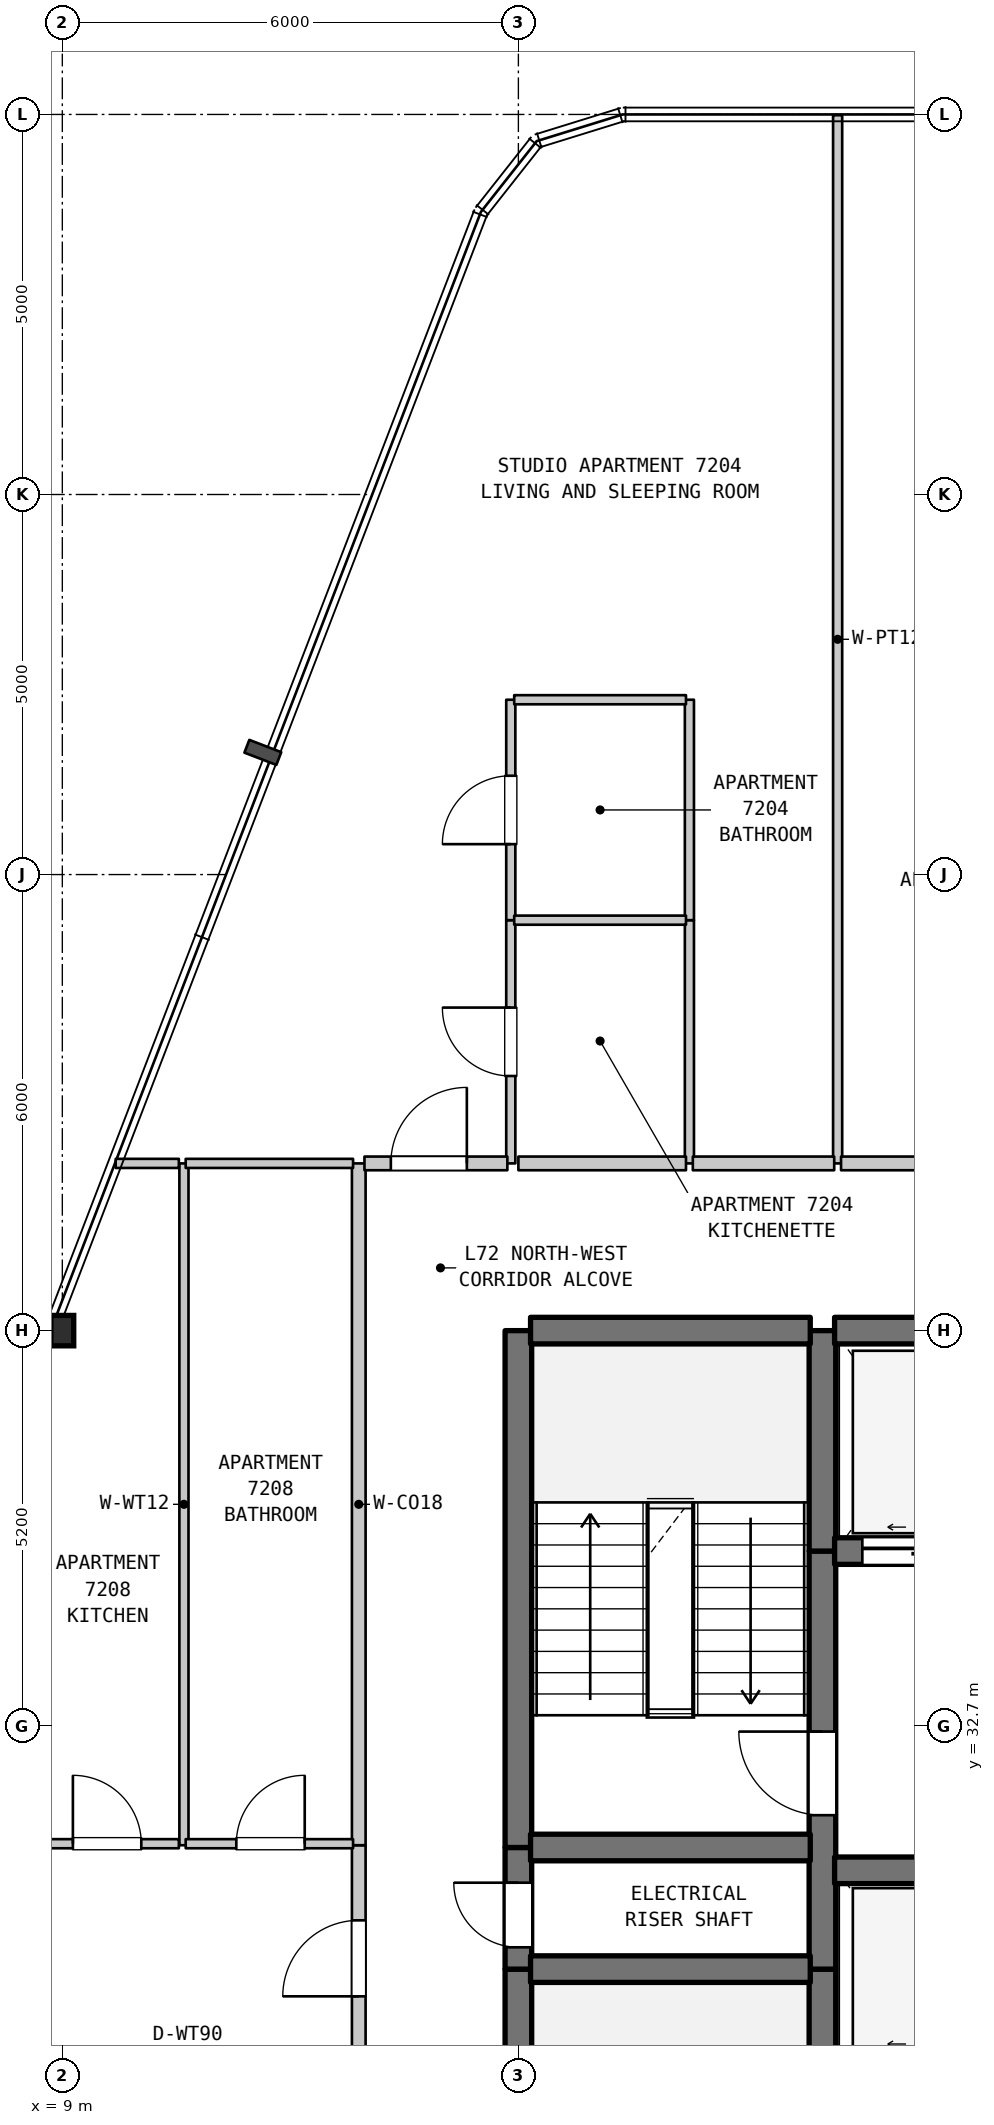
"""IFC4 building model, lengths in metres.
Left out: names, types, materials, properties, quantities, classifications, styles, units other than length and angle.
Written with IfcOpenShell. Run it as: python <this file> out.ifc"""

import sys

from ifc_helpers import new_model, si_unit, direction, frame, frame_2d, origin, origin_2d, place, context, subcontext, project, spatial, rectangle, i_section, extrude, element, fill, save


model = new_model("IFC4")
c1 = context("Model", 3, precision=1e-05, world=origin(), true_north=direction((0.0, 1.0)))
c2 = subcontext(c1, "Body", "Model", "MODEL_VIEW")
j1 = project(units=[si_unit("LENGTHUNIT", "METRE"), si_unit("PLANEANGLEUNIT", "RADIAN")], contexts=[c1])
p1 = place(None, origin())
s1 = spatial("IfcSite", under=j1, at=p1, CompositionType="ELEMENT")
p2 = place(p1, origin())
s2 = spatial("IfcBuilding", under=s1, at=p2, CompositionType="ELEMENT")
p3 = place(p2, frame((0.0, 0.0, 288.0)))
s3 = spatial("IfcBuildingStorey", under=s2, at=p3, CompositionType="ELEMENT", Elevation=288.0)
p4 = place(p3, frame((9.0, 37.9, 0.0), z_axis=(0.0, 0.0, 1.0), x_axis=(1.0, 0.0, 0.0)))
e1 = element("IfcColumn", 1, at=p4, inside=s3, PredefinedType="COLUMN", context=c2, shape_type="SweptSolid", body=[
    extrude(i_section(OverallWidth=0.3, OverallDepth=0.4, WebThickness=0.013, FlangeThickness=0.024, FilletRadius=0.027, at=origin_2d()), origin(), (0.0, 0.0, 1.0), 3.7),
])
p5 = place(p3, frame((10.6, 31.13, 0.0), z_axis=(0.0, 0.0, 1.0), x_axis=(0.0, 1.0, 0.0)))
e2 = element("IfcWall", 2, at=p5, inside=s3, PredefinedType="PARTITIONING", context=c2, shape_type="SweptSolid", body=[
    extrude(rectangle(XDim=8.97, YDim=0.12, at=frame_2d((4.485, 0.0))), origin(), (0.0, 0.0, 1.0), 3.39),
])
p6 = place(p3, frame((12.9, 28.3, 0.0), z_axis=(0.0, 0.0, 1.0), x_axis=(0.0, 1.0, 0.0)))
e3 = element("IfcWall", 3, at=p6, inside=s3, PredefinedType="STANDARD", context=c2, shape_type="SweptSolid", body=[
    extrude(rectangle(XDim=2.83, YDim=0.18, at=frame_2d((1.415, 0.0))), origin(), (0.0, 0.0, 1.0), 3.39),
])
p7 = place(p6, frame((0.842, 0.0, 0.0)))
e4 = element("IfcOpeningElement", 4, at=p7, cuts=e3, PredefinedType="OPENING", context=c2, shape_type="SweptSolid", body=[
    extrude(rectangle(XDim=1.0, YDim=2.15, at=frame_2d((0.5, 1.075))), frame((0.0, 0.1, 0.0), z_axis=(0.0, -1.0, 0.0), x_axis=(1.0, 0.0, 0.0)), (0.0, 0.0, 1.0), 0.2),
])
p8 = place(p3, frame((12.9, 31.13, 0.0), z_axis=(0.0, 0.0, 1.0), x_axis=(0.0, 1.0, 0.0)))
e5 = element("IfcWall", 5, at=p8, inside=s3, PredefinedType="STANDARD", context=c2, shape_type="SweptSolid", body=[
    extrude(rectangle(XDim=8.97, YDim=0.18, at=frame_2d((4.485, 0.0))), origin(), (0.0, 0.0, 1.0), 3.39),
])
p9 = place(p3, frame((14.9, 40.1, 0.0), z_axis=(0.0, 0.0, 1.0), x_axis=(0.0, 1.0, 0.0)))
e6 = element("IfcWall", 6, at=p9, inside=s3, PredefinedType="PARTITIONING", context=c2, shape_type="SweptSolid", body=[
    extrude(rectangle(XDim=3.2, YDim=0.12, at=frame_2d((1.6, 0.0))), origin(), (0.0, 0.0, 1.0), 3.39),
])
p10 = place(p9, frame((1.15, 0.0, 0.0)))
e7 = element("IfcOpeningElement", 7, at=p10, cuts=e6, PredefinedType="OPENING", context=c2, shape_type="SweptSolid", body=[
    extrude(rectangle(XDim=0.9, YDim=2.15, at=frame_2d((0.45, 1.075))), frame((0.0, 0.07, 0.0), z_axis=(0.0, -1.0, 0.0), x_axis=(1.0, 0.0, 0.0)), (0.0, 0.0, 1.0), 0.14),
])
p11 = place(p3, frame((14.9, 43.3, 0.0), z_axis=(0.0, 0.0, 1.0), x_axis=(0.0, 1.0, 0.0)))
e8 = element("IfcWall", 8, at=p11, inside=s3, PredefinedType="PARTITIONING", context=c2, shape_type="SweptSolid", body=[
    extrude(rectangle(XDim=2.9, YDim=0.12, at=frame_2d((1.45, 0.0))), origin(), (0.0, 0.0, 1.0), 3.39),
])
p12 = place(p11, frame((1.0, 0.0, 0.0)))
e9 = element("IfcOpeningElement", 9, at=p12, cuts=e8, PredefinedType="OPENING", context=c2, shape_type="SweptSolid", body=[
    extrude(rectangle(XDim=0.9, YDim=2.1, at=frame_2d((0.45, 1.05))), frame((0.0, 0.07, 0.0), z_axis=(0.0, -1.0, 0.0), x_axis=(1.0, 0.0, 0.0)), (0.0, 0.0, 1.0), 0.14),
])
p13 = place(p3, frame((15.0, 22.7, 0.0), z_axis=(0.0, 0.0, 1.0), x_axis=(0.0, 1.0, 0.0)))
e10 = element("IfcWall", 10, at=p13, inside=s3, PredefinedType="SHEAR", context=c2, shape_type="SweptSolid", body=[
    extrude(rectangle(XDim=6.8, YDim=0.35, at=frame_2d((3.4, 0.0))), origin(), (0.0, 0.0, 1.0), 3.39),
])
p14 = place(p3, frame((15.0, 29.5, 0.0), z_axis=(0.0, 0.0, 1.0), x_axis=(0.0, 1.0, 0.0)))
e11 = element("IfcWall", 11, at=p14, inside=s3, PredefinedType="SHEAR", context=c2, shape_type="SweptSolid", body=[
    extrude(rectangle(XDim=1.6, YDim=0.35, at=frame_2d((0.8, 0.0))), origin(), (0.0, 0.0, 1.0), 3.39),
])
p15 = place(p14, frame((0.287, 0.0, 0.0)))
e12 = element("IfcOpeningElement", 12, at=p15, cuts=e11, PredefinedType="OPENING", context=c2, shape_type="SweptSolid", body=[
    extrude(rectangle(XDim=0.85, YDim=2.1, at=frame_2d((0.425, 1.05))), frame((0.0, 0.185, 0.0), z_axis=(0.0, -1.0, 0.0), x_axis=(1.0, 0.0, 0.0)), (0.0, 0.0, 1.0), 0.37),
])
p16 = place(p3, frame((15.0, 31.1, 0.0), z_axis=(0.0, 0.0, 1.0), x_axis=(0.0, 1.0, 0.0)))
e13 = element("IfcWall", 13, at=p16, inside=s3, PredefinedType="SHEAR", context=c2, shape_type="SweptSolid", body=[
    extrude(rectangle(XDim=6.8, YDim=0.35, at=frame_2d((3.4, 0.0))), origin(), (0.0, 0.0, 1.0), 3.39),
])
p17 = place(p3, frame((17.25, 40.1, 0.0), z_axis=(0.0, 0.0, 1.0), x_axis=(0.0, 1.0, 0.0)))
e14 = element("IfcWall", 14, at=p17, inside=s3, PredefinedType="PARTITIONING", context=c2, shape_type="SweptSolid", body=[
    extrude(rectangle(XDim=3.2, YDim=0.12, at=frame_2d((1.6, 0.0))), origin(), (0.0, 0.0, 1.0), 3.39),
])
p18 = place(p3, frame((17.25, 43.3, 0.0), z_axis=(0.0, 0.0, 1.0), x_axis=(0.0, 1.0, 0.0)))
e15 = element("IfcWall", 15, at=p18, inside=s3, PredefinedType="PARTITIONING", context=c2, shape_type="SweptSolid", body=[
    extrude(rectangle(XDim=2.9, YDim=0.12, at=frame_2d((1.45, 0.0))), origin(), (0.0, 0.0, 1.0), 3.39),
])
p19 = place(p3, frame((19.0, 28.2, 0.0), z_axis=(0.0, 0.0, 1.0), x_axis=(0.0, 1.0, 0.0)))
e16 = element("IfcWall", 16, at=p19, inside=s3, PredefinedType="SHEAR", context=c2, shape_type="SweptSolid", body=[
    extrude(rectangle(XDim=1.3, YDim=0.35, at=frame_2d((0.65, 0.0))), origin(), (0.0, 0.0, 1.0), 3.39),
])
p20 = place(p3, frame((19.0, 29.5, 0.0), z_axis=(0.0, 0.0, 1.0), x_axis=(0.0, 1.0, 0.0)))
e17 = element("IfcWall", 17, at=p20, inside=s3, PredefinedType="SHEAR", context=c2, shape_type="SweptSolid", body=[
    extrude(rectangle(XDim=5.5, YDim=0.35, at=frame_2d((2.75, 0.0))), origin(), (0.0, 0.0, 1.0), 3.39),
])
p21 = place(p20, frame((2.025, 0.0, 0.0)))
e18 = element("IfcOpeningElement", 18, at=p21, cuts=e17, PredefinedType="OPENING", context=c2, shape_type="SweptSolid", body=[
    extrude(rectangle(XDim=1.1, YDim=2.15, at=frame_2d((0.55, 1.075))), frame((0.0, 0.185, 0.0), z_axis=(0.0, -1.0, 0.0), x_axis=(1.0, 0.0, 0.0)), (0.0, 0.0, 1.0), 0.37),
])
p22 = place(p3, frame((19.0, 35.0, 0.0), z_axis=(0.0, 0.0, 1.0), x_axis=(0.0, 1.0, 0.0)))
e19 = element("IfcWall", 19, at=p22, inside=s3, PredefinedType="SHEAR", context=c2, shape_type="SweptSolid", body=[
    extrude(rectangle(XDim=2.9, YDim=0.35, at=frame_2d((1.45, 0.0))), origin(), (0.0, 0.0, 1.0), 3.39),
])
p23 = place(p3, frame((19.2, 40.1, 0.0), z_axis=(0.0, 0.0, 1.0), x_axis=(0.0, 1.0, 0.0)))
e20 = element("IfcWall", 20, at=p23, inside=s3, PredefinedType="PARTITIONING", context=c2, shape_type="SweptSolid", body=[
    extrude(rectangle(XDim=13.79, YDim=0.12, at=frame_2d((6.895, 0.0))), origin(), (0.0, 0.0, 1.0), 3.39),
])
p24 = place(p3, frame((15.16, 29.5, 0.0), z_axis=(0.0, 0.0, 1.0), x_axis=(1.0, 0.0, 0.0)))
e21 = element("IfcWall", 21, at=p24, inside=s3, PredefinedType="SHEAR", context=c2, shape_type="SweptSolid", body=[
    extrude(rectangle(XDim=3.68, YDim=0.35, at=frame_2d((1.84, 0.0))), origin(), (0.0, 0.0, 1.0), 3.39),
])
p25 = place(p3, frame((19.16, 30.8, 0.0), z_axis=(0.0, 0.0, 1.0), x_axis=(1.0, 0.0, 0.0)))
e22 = element("IfcWall", 22, at=p25, inside=s3, PredefinedType="SHEAR", context=c2, shape_type="SweptSolid", body=[
    extrude(rectangle(XDim=4.48, YDim=0.35, at=frame_2d((2.24, 0.0))), origin(), (0.0, 0.0, 1.0), 3.39),
])
p26 = place(p3, frame((15.16, 31.1, 0.0), z_axis=(0.0, 0.0, 1.0), x_axis=(1.0, 0.0, 0.0)))
e23 = element("IfcWall", 23, at=p26, inside=s3, PredefinedType="SHEAR", context=c2, shape_type="SweptSolid", body=[
    extrude(rectangle(XDim=3.68, YDim=0.35, at=frame_2d((1.84, 0.0))), origin(), (0.0, 0.0, 1.0), 3.39),
])
p27 = place(p3, frame((8.645, 31.15, 0.0), z_axis=(0.0, 0.0, 1.0), x_axis=(1.0, 0.0, 0.0)))
e24 = element("IfcWall", 24, at=p27, inside=s3, PredefinedType="PARTITIONING", context=c2, shape_type="SweptSolid", body=[
    extrude(rectangle(XDim=1.888, YDim=0.12, at=frame_2d((0.944, 0.0))), origin(), (0.0, 0.0, 1.0), 3.39),
])
p28 = place(p27, frame((0.494, 0.0, 0.0)))
e25 = element("IfcOpeningElement", 25, at=p28, cuts=e24, PredefinedType="OPENING", context=c2, shape_type="SweptSolid", body=[
    extrude(rectangle(XDim=0.9, YDim=2.15, at=frame_2d((0.45, 1.075))), frame((0.0, 0.07, 0.0), z_axis=(0.0, -1.0, 0.0), x_axis=(1.0, 0.0, 0.0)), (0.0, 0.0, 1.0), 0.14),
])
p29 = place(p3, frame((10.623, 31.15, 0.0), z_axis=(0.0, 0.0, 1.0), x_axis=(1.0, 0.0, 0.0)))
e26 = element("IfcWall", 26, at=p29, inside=s3, PredefinedType="PARTITIONING", context=c2, shape_type="SweptSolid", body=[
    extrude(rectangle(XDim=2.202, YDim=0.12, at=frame_2d((1.101, 0.0))), origin(), (0.0, 0.0, 1.0), 3.39),
])
p30 = place(p29, frame((0.666, 0.0, 0.0)))
e27 = element("IfcOpeningElement", 27, at=p30, cuts=e26, PredefinedType="OPENING", context=c2, shape_type="SweptSolid", body=[
    extrude(rectangle(XDim=0.9, YDim=2.1, at=frame_2d((0.45, 1.05))), frame((0.0, 0.07, 0.0), z_axis=(0.0, -1.0, 0.0), x_axis=(1.0, 0.0, 0.0)), (0.0, 0.0, 1.0), 0.14),
])
p31 = place(p3, frame((19.16, 35.0, 0.0), z_axis=(0.0, 0.0, 1.0), x_axis=(1.0, 0.0, 0.0)))
e28 = element("IfcWall", 28, at=p31, inside=s3, PredefinedType="SHEAR", context=c2, shape_type="SweptSolid", body=[
    extrude(rectangle(XDim=4.48, YDim=0.35, at=frame_2d((2.24, 0.0))), origin(), (0.0, 0.0, 1.0), 3.39),
])
p32 = place(p31, frame((0.365, 0.0, 0.0)))
e29 = element("IfcOpeningElement", 29, at=p32, cuts=e28, PredefinedType="OPENING", context=c2, shape_type="SweptSolid", body=[
    extrude(rectangle(XDim=1.35, YDim=2.2, at=frame_2d((0.675, 1.1))), frame((0.0, 0.185, 0.0), z_axis=(0.0, -1.0, 0.0), x_axis=(1.0, 0.0, 0.0)), (0.0, 0.0, 1.0), 0.37),
])
p33 = place(p31, frame((2.765, 0.0, 0.0)))
e30 = element("IfcOpeningElement", 30, at=p33, cuts=e28, PredefinedType="OPENING", context=c2, shape_type="SweptSolid", body=[
    extrude(rectangle(XDim=1.35, YDim=2.2, at=frame_2d((0.675, 1.1))), frame((0.0, 0.185, 0.0), z_axis=(0.0, -1.0, 0.0), x_axis=(1.0, 0.0, 0.0)), (0.0, 0.0, 1.0), 0.37),
])
p34 = place(p3, frame((15.16, 37.9, 0.0), z_axis=(0.0, 0.0, 1.0), x_axis=(1.0, 0.0, 0.0)))
e31 = element("IfcWall", 31, at=p34, inside=s3, PredefinedType="SHEAR", context=c2, shape_type="SweptSolid", body=[
    extrude(rectangle(XDim=3.68, YDim=0.35, at=frame_2d((1.84, 0.0))), origin(), (0.0, 0.0, 1.0), 3.39),
])
p35 = place(p3, frame((19.16, 37.9, 0.0), z_axis=(0.0, 0.0, 1.0), x_axis=(1.0, 0.0, 0.0)))
e32 = element("IfcWall", 32, at=p35, inside=s3, PredefinedType="SHEAR", context=c2, shape_type="SweptSolid", body=[
    extrude(rectangle(XDim=4.48, YDim=0.35, at=frame_2d((2.24, 0.0))), origin(), (0.0, 0.0, 1.0), 3.39),
])
p36 = place(p3, frame((9.702, 40.1, 0.0), z_axis=(0.0, 0.0, 1.0), x_axis=(1.0, 0.0, 0.0)))
e33 = element("IfcWall", 33, at=p36, inside=s3, PredefinedType="PARTITIONING", context=c2, shape_type="SweptSolid", body=[
    extrude(rectangle(XDim=0.831, YDim=0.12, at=frame_2d((0.416, 0.0))), origin(), (0.0, 0.0, 1.0), 3.39),
])
p37 = place(p3, frame((10.623, 40.1, 0.0), z_axis=(0.0, 0.0, 1.0), x_axis=(1.0, 0.0, 0.0)))
e34 = element("IfcWall", 34, at=p37, inside=s3, PredefinedType="PARTITIONING", context=c2, shape_type="SweptSolid", body=[
    extrude(rectangle(XDim=2.202, YDim=0.12, at=frame_2d((1.101, 0.0))), origin(), (0.0, 0.0, 1.0), 3.39),
])
p38 = place(p3, frame((12.975, 40.1, 0.0), z_axis=(0.0, 0.0, 1.0), x_axis=(1.0, 0.0, 0.0)))
e35 = element("IfcWall", 35, at=p38, inside=s3, PredefinedType="STANDARD", context=c2, shape_type="SweptSolid", body=[
    extrude(rectangle(XDim=1.88, YDim=0.18, at=frame_2d((0.94, 0.0))), origin(), (0.0, 0.0, 1.0), 3.39),
])
p39 = place(p38, frame((0.347, 0.0, 0.0)))
e36 = element("IfcOpeningElement", 36, at=p39, cuts=e35, PredefinedType="OPENING", context=c2, shape_type="SweptSolid", body=[
    extrude(rectangle(XDim=1.0, YDim=2.15, at=frame_2d((0.5, 1.075))), frame((0.0, 0.1, 0.0), z_axis=(0.0, -1.0, 0.0), x_axis=(1.0, 0.0, 0.0)), (0.0, 0.0, 1.0), 0.2),
])
p40 = place(p3, frame((15.0, 40.1, 0.0), z_axis=(0.0, 0.0, 1.0), x_axis=(1.0, 0.0, 0.0)))
e37 = element("IfcWall", 37, at=p40, inside=s3, PredefinedType="STANDARD", context=c2, shape_type="SweptSolid", body=[
    extrude(rectangle(XDim=2.205, YDim=0.18, at=frame_2d((1.103, 0.0))), origin(), (0.0, 0.0, 1.0), 3.39),
])
p41 = place(p3, frame((17.295, 40.1, 0.0), z_axis=(0.0, 0.0, 1.0), x_axis=(1.0, 0.0, 0.0)))
e38 = element("IfcWall", 38, at=p41, inside=s3, PredefinedType="STANDARD", context=c2, shape_type="SweptSolid", body=[
    extrude(rectangle(XDim=1.86, YDim=0.18, at=frame_2d((0.93, 0.0))), origin(), (0.0, 0.0, 1.0), 3.39),
])
p42 = place(p3, frame((19.245, 40.1, 0.0), z_axis=(0.0, 0.0, 1.0), x_axis=(1.0, 0.0, 0.0)))
e39 = element("IfcWall", 39, at=p42, inside=s3, PredefinedType="STANDARD", context=c2, shape_type="SweptSolid", body=[
    extrude(rectangle(XDim=4.42, YDim=0.18, at=frame_2d((2.21, 0.0))), origin(), (0.0, 0.0, 1.0), 3.39),
])
p43 = place(p42, frame((1.638, 0.0, 0.0)))
e40 = element("IfcOpeningElement", 40, at=p43, cuts=e39, PredefinedType="OPENING", context=c2, shape_type="SweptSolid", body=[
    extrude(rectangle(XDim=1.0, YDim=2.15, at=frame_2d((0.5, 1.075))), frame((0.0, 0.1, 0.0), z_axis=(0.0, -1.0, 0.0), x_axis=(1.0, 0.0, 0.0)), (0.0, 0.0, 1.0), 0.2),
])
for number, where, z_axis, x_axis in (
    (41, (14.945, 43.3, 0.0), (0.0, 0.0, 1.0), (1.0, 0.0, 0.0)),
    (42, (14.945, 46.2, 0.0), (0.0, 0.0, 1.0), (1.0, 0.0, 0.0)),
):
    element("IfcWall", number, at=place(p3, frame(where, z_axis=z_axis, x_axis=x_axis)), inside=s3, PredefinedType="PARTITIONING", context=c2, shape_type="SweptSolid", body=[
        extrude(rectangle(XDim=2.26, YDim=0.12, at=frame_2d((1.13, 0.0))), origin(), (0.0, 0.0, 1.0), 3.39),
    ])
p44 = place(p7, origin())
e43 = element("IfcDoor", 43, at=p44, inside=s3, OperationType="SINGLE_SWING_LEFT", PredefinedType="DOOR", context=c2, shape_type="SweptSolid", body=[
    extrude(rectangle(XDim=1.0, YDim=2.15, at=frame_2d((0.5, 1.075))), frame((0.0, 0.025, 0.0), z_axis=(0.0, -1.0, 0.0), x_axis=(1.0, 0.0, 0.0)), (0.0, 0.0, 1.0), 0.05),
])
fill(e4, e43)
p45 = place(p10, origin())
e44 = element("IfcDoor", 44, at=p45, inside=s3, OperationType="SINGLE_SWING_RIGHT", PredefinedType="DOOR", context=c2, shape_type="SweptSolid", body=[
    extrude(rectangle(XDim=0.9, YDim=2.15, at=frame_2d((0.45, 1.075))), frame((0.0, 0.025, 0.0), z_axis=(0.0, -1.0, 0.0), x_axis=(1.0, 0.0, 0.0)), (0.0, 0.0, 1.0), 0.05),
])
fill(e7, e44)
p46 = place(p12, origin())
e45 = element("IfcDoor", 45, at=p46, inside=s3, OperationType="SINGLE_SWING_LEFT", PredefinedType="DOOR", context=c2, shape_type="SweptSolid", body=[
    extrude(rectangle(XDim=0.9, YDim=2.1, at=frame_2d((0.45, 1.05))), frame((0.0, 0.025, 0.0), z_axis=(0.0, -1.0, 0.0), x_axis=(1.0, 0.0, 0.0)), (0.0, 0.0, 1.0), 0.05),
])
fill(e9, e45)
p47 = place(p15, origin())
e46 = element("IfcDoor", 46, at=p47, inside=s3, OperationType="SINGLE_SWING_RIGHT", PredefinedType="DOOR", context=c2, shape_type="SweptSolid", body=[
    extrude(rectangle(XDim=0.85, YDim=2.1, at=frame_2d((0.425, 1.05))), frame((0.0, 0.025, 0.0), z_axis=(0.0, -1.0, 0.0), x_axis=(1.0, 0.0, 0.0)), (0.0, 0.0, 1.0), 0.05),
])
fill(e12, e46)
p48 = place(p21, origin())
e47 = element("IfcDoor", 47, at=p48, inside=s3, OperationType="SINGLE_SWING_RIGHT", PredefinedType="DOOR", context=c2, shape_type="SweptSolid", body=[
    extrude(rectangle(XDim=1.1, YDim=2.15, at=frame_2d((0.55, 1.075))), frame((0.0, 0.025, 0.0), z_axis=(0.0, -1.0, 0.0), x_axis=(1.0, 0.0, 0.0)), (0.0, 0.0, 1.0), 0.05),
])
fill(e18, e47)
p49 = place(p28, origin())
e48 = element("IfcDoor", 48, at=p49, inside=s3, OperationType="SINGLE_SWING_LEFT", PredefinedType="DOOR", context=c2, shape_type="SweptSolid", body=[
    extrude(rectangle(XDim=0.9, YDim=2.15, at=frame_2d((0.45, 1.075))), frame((0.0, 0.025, 0.0), z_axis=(0.0, -1.0, 0.0), x_axis=(1.0, 0.0, 0.0)), (0.0, 0.0, 1.0), 0.05),
])
fill(e25, e48)
p50 = place(p30, origin())
e49 = element("IfcDoor", 49, at=p50, inside=s3, OperationType="SINGLE_SWING_RIGHT", PredefinedType="DOOR", context=c2, shape_type="SweptSolid", body=[
    extrude(rectangle(XDim=0.9, YDim=2.1, at=frame_2d((0.45, 1.05))), frame((0.0, 0.025, 0.0), z_axis=(0.0, -1.0, 0.0), x_axis=(1.0, 0.0, 0.0)), (0.0, 0.0, 1.0), 0.05),
])
fill(e27, e49)
p51 = place(p32, origin())
e50 = element("IfcDoor", 50, at=p51, inside=s3, OperationType="DOUBLE_DOOR_SLIDING", PredefinedType="DOOR", context=c2, shape_type="SweptSolid", body=[
    extrude(rectangle(XDim=1.35, YDim=2.2, at=frame_2d((0.675, 1.1))), frame((0.0, 0.025, 0.0), z_axis=(0.0, -1.0, 0.0), x_axis=(1.0, 0.0, 0.0)), (0.0, 0.0, 1.0), 0.05),
])
fill(e29, e50)
p52 = place(p39, origin())
e51 = element("IfcDoor", 51, at=p52, inside=s3, OperationType="SINGLE_SWING_RIGHT", PredefinedType="DOOR", context=c2, shape_type="SweptSolid", body=[
    extrude(rectangle(XDim=1.0, YDim=2.15, at=frame_2d((0.5, 1.075))), frame((0.0, 0.025, 0.0), z_axis=(0.0, -1.0, 0.0), x_axis=(1.0, 0.0, 0.0)), (0.0, 0.0, 1.0), 0.05),
])
fill(e36, e51)
save(model, sys.argv[1])
